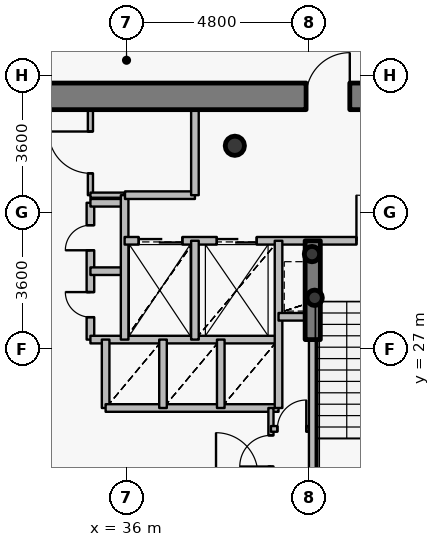
"""IFC4 building model, lengths in metres.
Left out: names, types, materials, properties, quantities, classifications, styles, units other than length and angle.
Written with IfcOpenShell. Run it as: python <this file> out.ifc"""

import sys

from ifc_helpers import new_model, si_unit, direction, frame, frame_2d, origin, origin_2d, place, context, subcontext, project, spatial, rectangle, hollow_circle, extrude, source, transform, mapped, element, fill, save


model = new_model("IFC4")
c1 = context("Model", 3, precision=1e-05, world=origin(), true_north=direction((0.0, 1.0)))
c2 = subcontext(c1, "Body", "Model", "MODEL_VIEW")
j1 = project(units=[si_unit("LENGTHUNIT", "METRE"), si_unit("PLANEANGLEUNIT", "RADIAN")], contexts=[c1])
p1 = place(None, origin())
s1 = spatial("IfcSite", under=j1, at=p1, CompositionType="ELEMENT")
p2 = place(p1, origin())
s2 = spatial("IfcBuilding", under=s1, at=p2, CompositionType="ELEMENT")
p3 = place(p2, frame((0.0, 0.0, 251.55)))
s3 = spatial("IfcBuildingStorey", under=s2, at=p3, CompositionType="ELEMENT", Elevation=251.55)
p4 = place(p3, frame((38.85, 32.35, 0.0), z_axis=(0.0, 0.0, 1.0), x_axis=(1.0, 0.0, 0.0)))
e1 = element("IfcColumn", 1, at=p4, inside=s3, PredefinedType="COLUMN", context=c2, shape_type="SweptSolid", body=[
    extrude(hollow_circle(Radius=0.254, WallThickness=0.02, at=origin_2d()), origin(), (0.0, 0.0, 1.0), 3.75),
])
for number, where, z_axis, x_axis in (
    (2, (40.95, 28.35, 0.0), (0.0, 0.0, 1.0), (1.0, 0.0, 0.0)),
    (3, (40.88, 29.5, 0.0), (0.0, 0.0, 1.0), (1.0, 0.0, 0.0)),
):
    element("IfcColumn", number, at=place(p3, frame(where, z_axis=z_axis, x_axis=x_axis)), inside=s3, PredefinedType="COLUMN", context=c2, shape_type="SweptSolid", body=[
        extrude(hollow_circle(Radius=0.203, WallThickness=0.016, at=origin_2d()), origin(), (0.0, 0.0, 1.0), 3.75),
    ])
p5 = place(p3, frame((27.05, 33.65, 0.0), z_axis=(0.0, 0.0, 1.0), x_axis=(1.0, 0.0, 0.0)))
e4 = element("IfcWall", 4, at=p5, inside=s3, PredefinedType="SHEAR", context=c2, shape_type="SweptSolid", body=[
    extrude(rectangle(XDim=17.9, YDim=0.7, at=frame_2d((8.95, 0.0))), origin(), (0.0, 0.0, 1.0), 3.05),
])
p6 = place(p5, frame((13.675, 0.0, 0.0)))
e5 = element("IfcOpeningElement", 5, at=p6, cuts=e4, PredefinedType="OPENING", context=c2, shape_type="SweptSolid", body=[
    extrude(rectangle(XDim=1.15, YDim=2.15, at=origin_2d()), frame((0.575, 0.36, 1.075), z_axis=(0.0, -1.0, 0.0), x_axis=(1.0, 0.0, 0.0)), (0.0, 0.0, 1.0), 0.72),
])
p7 = place(p3, frame((40.9, 27.25, 0.0), z_axis=(0.0, 0.0, 1.0), x_axis=(0.0, 1.0, 0.0)))
e6 = element("IfcWall", 6, at=p7, inside=s3, PredefinedType="SHEAR", context=c2, shape_type="SweptSolid", body=[
    extrude(rectangle(XDim=2.6, YDim=0.4, at=frame_2d((1.3, 0.0))), origin(), (0.0, 0.0, 1.0), 3.1),
])
p8 = place(p3, frame((35.05, 27.25, 0.0), z_axis=(0.0, 0.0, 1.0), x_axis=(0.0, 1.0, 0.0)))
e7 = element("IfcWall", 7, at=p8, inside=s3, PredefinedType="PARTITIONING", context=c2, shape_type="SweptSolid", body=[
    extrude(rectangle(XDim=3.6, YDim=0.2, at=frame_2d((1.8, 0.0))), origin(), (0.0, 0.0, 1.0), 3.5),
])
p9 = place(p8, frame((0.59, 0.0, 0.0)))
e8 = element("IfcOpeningElement", 8, at=p9, cuts=e7, PredefinedType="OPENING", context=c2, shape_type="SweptSolid", body=[
    extrude(rectangle(XDim=0.66, YDim=2.05, at=origin_2d()), frame((0.33, 0.11, 1.025), z_axis=(0.0, -1.0, 0.0), x_axis=(1.0, 0.0, 0.0)), (0.0, 0.0, 1.0), 0.22),
])
p10 = place(p8, frame((2.35, 0.0, 0.0)))
e9 = element("IfcOpeningElement", 9, at=p10, cuts=e7, PredefinedType="OPENING", context=c2, shape_type="SweptSolid", body=[
    extrude(rectangle(XDim=0.66, YDim=2.05, at=origin_2d()), frame((0.33, 0.11, 1.025), z_axis=(0.0, -1.0, 0.0), x_axis=(1.0, 0.0, 0.0)), (0.0, 0.0, 1.0), 0.22),
])
p11 = place(p3, frame((35.05, 27.25, 0.0), z_axis=(0.0, 0.0, 1.0), x_axis=(1.0, 0.0, 0.0)))
e10 = element("IfcWall", 10, at=p11, inside=s3, PredefinedType="PARTITIONING", context=c2, shape_type="SweptSolid", body=[
    extrude(rectangle(XDim=4.95, YDim=0.2, at=frame_2d((2.475, 0.0))), origin(), (0.0, 0.0, 1.0), 3.085),
])
for number, where, z_axis, x_axis in (
    (11, (35.05, 29.05, 0.0), (0.0, 0.0, 1.0), (1.0, 0.0, 0.0)),
    (12, (35.05, 30.85, 0.0), (0.0, 0.0, 1.0), (1.0, 0.0, 0.0)),
):
    element("IfcWall", number, at=place(p3, frame(where, z_axis=z_axis, x_axis=x_axis)), inside=s3, PredefinedType="PARTITIONING", context=c2, shape_type="SweptSolid", body=[
        extrude(rectangle(XDim=0.9, YDim=0.2, at=frame_2d((0.45, 0.0))), origin(), (0.0, 0.0, 1.0), 3.5),
    ])
p12 = place(p3, frame((35.05, 31.05, 0.0), z_axis=(0.0, 0.0, 1.0), x_axis=(0.0, 1.0, 0.0)))
e13 = element("IfcWall", 13, at=p12, inside=s3, PredefinedType="PARTITIONING", context=c2, shape_type="SweptSolid", body=[
    extrude(rectangle(XDim=2.25, YDim=0.135, at=frame_2d((1.125, 0.0))), origin(), (0.0, 0.0, 1.0), 3.085),
])
p13 = place(p12, frame((0.575, 0.0, 0.0)))
e14 = element("IfcOpeningElement", 14, at=p13, cuts=e13, PredefinedType="OPENING", context=c2, shape_type="SweptSolid", body=[
    extrude(rectangle(XDim=1.1, YDim=2.15, at=origin_2d()), frame((0.55, 0.078, 1.075), z_axis=(0.0, -1.0, 0.0), x_axis=(1.0, 0.0, 0.0)), (0.0, 0.0, 1.0), 0.155),
])
p14 = place(p3, frame((35.05, 31.05, 0.0), z_axis=(0.0, 0.0, 1.0), x_axis=(1.0, 0.0, 0.0)))
e15 = element("IfcWall", 15, at=p14, inside=s3, PredefinedType="PARTITIONING", context=c2, shape_type="SweptSolid", body=[
    extrude(rectangle(XDim=0.9, YDim=0.135, at=frame_2d((0.45, 0.0))), origin(), (0.0, 0.0, 1.0), 3.5),
])
p15 = place(p3, frame((35.45, 25.45, 0.0), z_axis=(0.0, 0.0, 1.0), x_axis=(0.0, 1.0, 0.0)))
e16 = element("IfcWall", 16, at=p15, inside=s3, PredefinedType="PARTITIONING", context=c2, shape_type="SweptSolid", body=[
    extrude(rectangle(XDim=1.8, YDim=0.2, at=frame_2d((0.9, 0.0))), origin(), (0.0, 0.0, 1.0), 3.5),
])
p16 = place(p3, frame((35.45, 25.45, 0.0), z_axis=(0.0, 0.0, 1.0), x_axis=(1.0, 0.0, 0.0)))
e17 = element("IfcWall", 17, at=p16, inside=s3, PredefinedType="PARTITIONING", context=c2, shape_type="SweptSolid", body=[
    extrude(rectangle(XDim=4.55, YDim=0.2, at=frame_2d((2.275, 0.0))), origin(), (0.0, 0.0, 1.0), 3.085),
])
p17 = place(p3, frame((35.95, 27.25, 0.0), z_axis=(0.0, 0.0, 1.0), x_axis=(0.0, 1.0, 0.0)))
e18 = element("IfcWall", 18, at=p17, inside=s3, PredefinedType="PARTITIONING", context=c2, shape_type="SweptSolid", body=[
    extrude(rectangle(XDim=3.8, YDim=0.2, at=frame_2d((1.9, 0.0))), origin(), (0.0, 0.0, 1.0), 3.5),
])
p18 = place(p3, frame((35.95, 29.85, 0.0), z_axis=(0.0, 0.0, 1.0), x_axis=(1.0, 0.0, 0.0)))
e19 = element("IfcWall", 19, at=p18, inside=s3, PredefinedType="PARTITIONING", context=c2, shape_type="SweptSolid", body=[
    extrude(rectangle(XDim=8.49, YDim=0.2, at=frame_2d((4.245, 0.0))), origin(), (0.0, 0.0, 1.0), 3.085),
])
p19 = place(p18, frame((6.1, 0.0, 0.0)))
e20 = element("IfcOpeningElement", 20, at=p19, cuts=e19, PredefinedType="OPENING", context=c2, shape_type="SweptSolid", body=[
    extrude(rectangle(XDim=1.2, YDim=2.15, at=origin_2d()), frame((0.6, 0.11, 1.075), z_axis=(0.0, -1.0, 0.0), x_axis=(1.0, 0.0, 0.0)), (0.0, 0.0, 1.0), 0.22),
])
p20 = place(p18, frame((0.37, 0.0, 0.0)))
e21 = element("IfcOpeningElement", 21, at=p20, cuts=e19, PredefinedType="OPENING", context=c2, shape_type="SweptSolid", body=[
    extrude(rectangle(XDim=1.15, YDim=2.15, at=origin_2d()), frame((0.575, 0.11, 1.075), z_axis=(0.0, -1.0, 0.0), x_axis=(1.0, 0.0, 0.0)), (0.0, 0.0, 1.0), 0.22),
])
p21 = place(p18, frame((2.425, 0.0, 0.0)))
e22 = element("IfcOpeningElement", 22, at=p21, cuts=e19, PredefinedType="OPENING", context=c2, shape_type="SweptSolid", body=[
    extrude(rectangle(XDim=1.05, YDim=2.15, at=origin_2d()), frame((0.525, 0.11, 1.075), z_axis=(0.0, -1.0, 0.0), x_axis=(1.0, 0.0, 0.0)), (0.0, 0.0, 1.0), 0.22),
])
p22 = place(p3, frame((35.96, 31.05, 0.0), z_axis=(0.0, 0.0, 1.0), x_axis=(1.0, 0.0, 0.0)))
e23 = element("IfcWall", 23, at=p22, inside=s3, PredefinedType="PARTITIONING", context=c2, shape_type="SweptSolid", body=[
    extrude(rectangle(XDim=1.84, YDim=0.2, at=frame_2d((0.92, 0.0))), origin(), (0.0, 0.0, 1.0), 3.5),
])
p23 = place(p3, frame((36.96, 25.45, 0.0), z_axis=(0.0, 0.0, 1.0), x_axis=(0.0, 1.0, 0.0)))
e24 = element("IfcWall", 24, at=p23, inside=s3, PredefinedType="PARTITIONING", context=c2, shape_type="SweptSolid", body=[
    extrude(rectangle(XDim=1.8, YDim=0.2, at=frame_2d((0.9, 0.0))), origin(), (0.0, 0.0, 1.0), 3.5),
])
p24 = place(p3, frame((37.8, 27.25, 0.0), z_axis=(0.0, 0.0, 1.0), x_axis=(0.0, 1.0, 0.0)))
e25 = element("IfcWall", 25, at=p24, inside=s3, PredefinedType="PARTITIONING", context=c2, shape_type="SweptSolid", body=[
    extrude(rectangle(XDim=2.6, YDim=0.2, at=frame_2d((1.3, 0.0))), origin(), (0.0, 0.0, 1.0), 3.5),
])
p25 = place(p3, frame((37.8, 31.05, 0.0), z_axis=(0.0, 0.0, 1.0), x_axis=(0.0, 1.0, 0.0)))
e26 = element("IfcWall", 26, at=p25, inside=s3, PredefinedType="PARTITIONING", context=c2, shape_type="SweptSolid", body=[
    extrude(rectangle(XDim=2.25, YDim=0.2, at=frame_2d((1.125, 0.0))), origin(), (0.0, 0.0, 1.0), 3.085),
])
p26 = place(p3, frame((38.48, 25.45, 0.0), z_axis=(0.0, 0.0, 1.0), x_axis=(0.0, 1.0, 0.0)))
e27 = element("IfcWall", 27, at=p26, inside=s3, PredefinedType="PARTITIONING", context=c2, shape_type="SweptSolid", body=[
    extrude(rectangle(XDim=1.8, YDim=0.2, at=frame_2d((0.9, 0.0))), origin(), (0.0, 0.0, 1.0), 3.5),
])
p27 = place(p3, frame((39.8, 23.7, 0.0), z_axis=(0.0, 0.0, 1.0), x_axis=(0.0, 1.0, 0.0)))
e28 = element("IfcWall", 28, at=p27, inside=s3, PredefinedType="PARTITIONING", context=c2, shape_type="SweptSolid", body=[
    extrude(rectangle(XDim=1.75, YDim=0.135, at=frame_2d((0.875, 0.0))), origin(), (0.0, 0.0, 1.0), 3.5),
])
p28 = place(p27, frame((0.21, 0.0, 0.0)))
e29 = element("IfcOpeningElement", 29, at=p28, cuts=e28, PredefinedType="OPENING", context=c2, shape_type="SweptSolid", body=[
    extrude(rectangle(XDim=0.82, YDim=2.1, at=origin_2d()), frame((0.41, 0.078, 1.05), z_axis=(0.0, -1.0, 0.0), x_axis=(1.0, 0.0, 0.0)), (0.0, 0.0, 1.0), 0.155),
])
p29 = place(p3, frame((39.8, 24.9, 0.0), z_axis=(0.0, 0.0, 1.0), x_axis=(1.0, 0.0, 0.0)))
e30 = element("IfcWall", 30, at=p29, inside=s3, PredefinedType="PARTITIONING", context=c2, shape_type="SweptSolid", body=[
    extrude(rectangle(XDim=1.1, YDim=0.15, at=frame_2d((0.55, 0.0))), origin(), (0.0, 0.0, 1.0), 3.5),
])
p30 = place(p29, frame((0.17, 0.0, 0.0)))
e31 = element("IfcOpeningElement", 31, at=p30, cuts=e30, PredefinedType="OPENING", context=c2, shape_type="SweptSolid", body=[
    extrude(rectangle(XDim=0.76, YDim=2.1, at=origin_2d()), frame((0.38, 0.085, 1.05), z_axis=(0.0, -1.0, 0.0), x_axis=(1.0, 0.0, 0.0)), (0.0, 0.0, 1.0), 0.17),
])
p31 = place(p3, frame((40.0, 25.45, 0.0), z_axis=(0.0, 0.0, 1.0), x_axis=(0.0, 1.0, 0.0)))
e32 = element("IfcWall", 32, at=p31, inside=s3, PredefinedType="PARTITIONING", context=c2, shape_type="SweptSolid", body=[
    extrude(rectangle(XDim=4.4, YDim=0.2, at=frame_2d((2.2, 0.0))), origin(), (0.0, 0.0, 1.0), 3.5),
])
p32 = place(p3, frame((40.0, 27.85, 0.0), z_axis=(0.0, 0.0, 1.0), x_axis=(1.0, 0.0, 0.0)))
e33 = element("IfcWall", 33, at=p32, inside=s3, PredefinedType="PARTITIONING", context=c2, shape_type="SweptSolid", body=[
    extrude(rectangle(XDim=0.9, YDim=0.2, at=frame_2d((0.45, 0.0))), origin(), (0.0, 0.0, 1.0), 3.5),
])
p33 = place(p3, frame((40.9, 21.33, 0.0), z_axis=(0.0, 0.0, 1.0), x_axis=(0.0, 1.0, 0.0)))
e34 = element("IfcWall", 34, at=p33, inside=s3, PredefinedType="PARTITIONING", context=c2, shape_type="SweptSolid", body=[
    extrude(rectangle(XDim=5.91, YDim=0.2, at=frame_2d((2.955, 0.0))), origin(), (0.0, 0.0, 1.0), 3.035),
])
m1 = source(origin(), c2, "Body", "SweptSolid", [
    extrude(rectangle(XDim=1.15, YDim=2.15, at=origin_2d()), frame((0.575, 0.025, 1.075), z_axis=(0.0, -1.0, 0.0), x_axis=(1.0, 0.0, 0.0)), (0.0, 0.0, 1.0), 0.05),
])
p34 = place(p6, origin())
e35 = element("IfcDoor", 35, at=p34, inside=s3, OperationType="SINGLE_SWING_RIGHT", PredefinedType="DOOR", context=c2, shape_type="MappedRepresentation", body=[
    mapped(m1, transform((0.0, 0.0, 0.0), x_axis=(1.0, 0.0, 0.0), y_axis=(0.0, 1.0, 0.0), z_axis=(0.0, 0.0, 1.0), scale=1.0)),
])
fill(e5, e35)
m2 = source(origin(), c2, "Body", "SweptSolid", [
    extrude(rectangle(XDim=1.2, YDim=2.15, at=origin_2d()), frame((0.6, 0.025, 1.075), z_axis=(0.0, -1.0, 0.0), x_axis=(1.0, 0.0, 0.0)), (0.0, 0.0, 1.0), 0.05),
])
p35 = place(p19, origin())
e36 = element("IfcDoor", 36, at=p35, inside=s3, OperationType="SINGLE_SWING_LEFT", PredefinedType="DOOR", context=c2, shape_type="MappedRepresentation", body=[
    mapped(m2, transform((0.0, 0.0, 0.0), x_axis=(1.0, 0.0, 0.0), y_axis=(0.0, 1.0, 0.0), z_axis=(0.0, 0.0, 1.0), scale=1.0)),
])
fill(e20, e36)
m3 = source(origin(), c2, "Body", "SweptSolid", [
    extrude(rectangle(XDim=1.15, YDim=2.15, at=origin_2d()), frame((0.575, 0.025, 1.075), z_axis=(0.0, -1.0, 0.0), x_axis=(1.0, 0.0, 0.0)), (0.0, 0.0, 1.0), 0.05),
])
p36 = place(p20, origin())
e37 = element("IfcDoor", 37, at=p36, inside=s3, OperationType="DOUBLE_DOOR_SLIDING", PredefinedType="USERDEFINED", context=c2, shape_type="MappedRepresentation", body=[
    mapped(m3, transform((0.0, 0.0, 0.0), x_axis=(1.0, 0.0, 0.0), y_axis=(0.0, 1.0, 0.0), z_axis=(0.0, 0.0, 1.0), scale=1.0)),
])
fill(e21, e37)
m4 = source(origin(), c2, "Body", "SweptSolid", [
    extrude(rectangle(XDim=1.05, YDim=2.15, at=origin_2d()), frame((0.525, 0.025, 1.075), z_axis=(0.0, -1.0, 0.0), x_axis=(1.0, 0.0, 0.0)), (0.0, 0.0, 1.0), 0.05),
])
p37 = place(p21, origin())
e38 = element("IfcDoor", 38, at=p37, inside=s3, OperationType="DOUBLE_DOOR_SLIDING", PredefinedType="USERDEFINED", context=c2, shape_type="MappedRepresentation", body=[
    mapped(m4, transform((0.0, 0.0, 0.0), x_axis=(1.0, 0.0, 0.0), y_axis=(0.0, 1.0, 0.0), z_axis=(0.0, 0.0, 1.0), scale=1.0)),
])
fill(e22, e38)
m5 = source(origin(), c2, "Body", "SweptSolid", [
    extrude(rectangle(XDim=0.66, YDim=2.05, at=origin_2d()), frame((0.33, 0.025, 1.025), z_axis=(0.0, -1.0, 0.0), x_axis=(1.0, 0.0, 0.0)), (0.0, 0.0, 1.0), 0.05),
])
p38 = place(p9, origin())
e39 = element("IfcDoor", 39, at=p38, inside=s3, OperationType="SINGLE_SWING_RIGHT", PredefinedType="USERDEFINED", context=c2, shape_type="MappedRepresentation", body=[
    mapped(m5, transform((0.0, 0.0, 0.0), x_axis=(1.0, 0.0, 0.0), y_axis=(0.0, 1.0, 0.0), z_axis=(0.0, 0.0, 1.0), scale=1.0)),
])
fill(e8, e39)
p39 = place(p10, origin())
e40 = element("IfcDoor", 40, at=p39, inside=s3, OperationType="SINGLE_SWING_LEFT", PredefinedType="USERDEFINED", context=c2, shape_type="MappedRepresentation", body=[
    mapped(m5, transform((0.0, 0.0, 0.0), x_axis=(1.0, 0.0, 0.0), y_axis=(0.0, 1.0, 0.0), z_axis=(0.0, 0.0, 1.0), scale=1.0)),
])
fill(e9, e40)
m6 = source(origin(), c2, "Body", "SweptSolid", [
    extrude(rectangle(XDim=1.1, YDim=2.15, at=origin_2d()), frame((0.55, 0.025, 1.075), z_axis=(0.0, -1.0, 0.0), x_axis=(1.0, 0.0, 0.0)), (0.0, 0.0, 1.0), 0.05),
])
p40 = place(p13, origin())
e41 = element("IfcDoor", 41, at=p40, inside=s3, OperationType="SINGLE_SWING_RIGHT", PredefinedType="DOOR", context=c2, shape_type="MappedRepresentation", body=[
    mapped(m6, transform((0.0, 0.0, 0.0), x_axis=(1.0, 0.0, 0.0), y_axis=(0.0, 1.0, 0.0), z_axis=(0.0, 0.0, 1.0), scale=1.0)),
])
fill(e14, e41)
m7 = source(origin(), c2, "Body", "SweptSolid", [
    extrude(rectangle(XDim=0.82, YDim=2.1, at=origin_2d()), frame((0.41, 0.025, 1.05), z_axis=(0.0, -1.0, 0.0), x_axis=(1.0, 0.0, 0.0)), (0.0, 0.0, 1.0), 0.05),
])
p41 = place(p28, origin())
e42 = element("IfcDoor", 42, at=p41, inside=s3, OperationType="SINGLE_SWING_LEFT", PredefinedType="DOOR", context=c2, shape_type="MappedRepresentation", body=[
    mapped(m7, transform((0.0, 0.0, 0.0), x_axis=(1.0, 0.0, 0.0), y_axis=(0.0, 1.0, 0.0), z_axis=(0.0, 0.0, 1.0), scale=1.0)),
])
fill(e29, e42)
m8 = source(origin(), c2, "Body", "SweptSolid", [
    extrude(rectangle(XDim=0.76, YDim=2.1, at=origin_2d()), frame((0.38, 0.025, 1.05), z_axis=(0.0, -1.0, 0.0), x_axis=(1.0, 0.0, 0.0)), (0.0, 0.0, 1.0), 0.05),
])
p42 = place(p30, origin())
e43 = element("IfcDoor", 43, at=p42, inside=s3, OperationType="SINGLE_SWING_RIGHT", PredefinedType="DOOR", context=c2, shape_type="MappedRepresentation", body=[
    mapped(m8, transform((0.0, 0.0, 0.0), x_axis=(1.0, 0.0, 0.0), y_axis=(0.0, 1.0, 0.0), z_axis=(0.0, 0.0, 1.0), scale=1.0)),
])
fill(e31, e43)
save(model, sys.argv[1])
